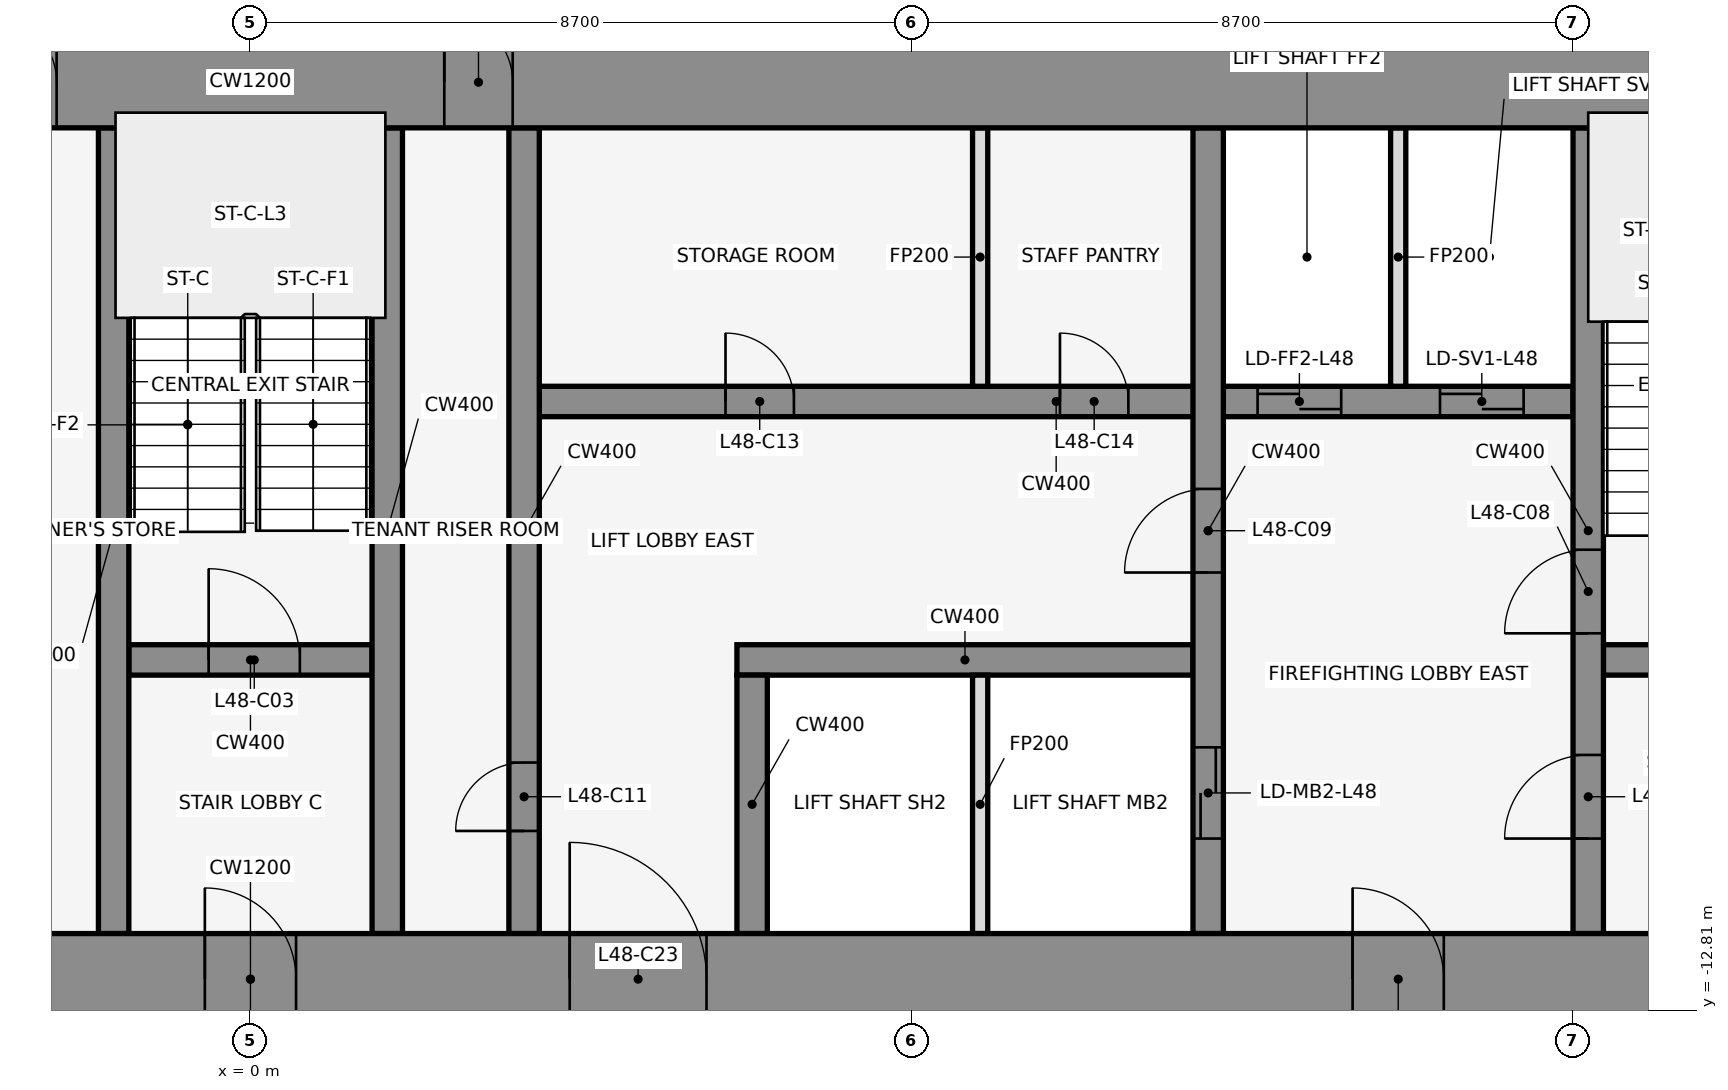
"""IFC4 building model, lengths in metres.
Left out: names, types, materials, properties, quantities, classifications, styles, units other than length and angle.
Written with IfcOpenShell. Run it as: python <this file> out.ifc"""

import sys

from ifc_helpers import new_model, si_unit, direction, frame, frame_2d, origin, place, context, subcontext, project, spatial, rectangle, extrude, element, fill, save


model = new_model("IFC4")
c1 = context("Model", 3, precision=1e-05, world=origin(), true_north=direction((0.0, 1.0)))
c2 = subcontext(c1, "Body", "Model", "MODEL_VIEW")
j1 = project(units=[si_unit("LENGTHUNIT", "METRE"), si_unit("PLANEANGLEUNIT", "RADIAN")], contexts=[c1])
p1 = place(None, origin())
s1 = spatial("IfcSite", under=j1, at=p1, CompositionType="ELEMENT")
p2 = place(p1, origin())
s2 = spatial("IfcBuilding", under=s1, at=p2, CompositionType="ELEMENT")
p3 = place(p2, frame((0.0, 0.0, 215.5)))
s3 = spatial("IfcBuildingStorey", under=s2, at=p3, CompositionType="ELEMENT", Elevation=215.5)
for number, where, z_axis, x_axis in (
    (1, (16.432, -0.105, 0.0), (0.0, 0.0, 1.0), (-0.84, 0.543, 0.0)),
    (2, (1.901, 1.08, 0.0), (0.0, 0.0, 1.0), (-0.84, -0.543, 0.0)),
    (3, (-0.068, -0.105, 0.0), (0.0, 0.0, 1.0), (-0.84, 0.543, 0.0)),
):
    element("IfcWall", number, at=place(p3, frame(where, z_axis=z_axis, x_axis=x_axis)), inside=s3, PredefinedType="STANDARD", context=c2, shape_type="SweptSolid", body=[
        extrude(rectangle(XDim=2.183, YDim=0.25, at=frame_2d((1.091, 0.0))), origin(), (0.0, 0.0, 1.0), 3.95),
    ])
p4 = place(p3, frame((-1.6, -8.2, 0.0), z_axis=(0.0, 0.0, 1.0), x_axis=(1.0, 0.0, 0.0)))
e4 = element("IfcWall", 4, at=p4, inside=s3, PredefinedType="SHEAR", context=c2, shape_type="SweptSolid", body=[
    extrude(rectangle(XDim=3.2, YDim=0.4, at=frame_2d((1.6, 0.0))), origin(), (0.0, 0.0, 1.0), 4.1),
])
p5 = place(p4, frame((1.05, 0.0, 0.0)))
e5 = element("IfcOpeningElement", 5, at=p5, cuts=e4, PredefinedType="OPENING", context=c2, shape_type="SweptSolid", body=[
    extrude(rectangle(XDim=1.2, YDim=2.1, at=frame_2d((0.6, 1.05))), frame((0.0, 0.212, 0.0), z_axis=(0.0, -1.0, 0.0), x_axis=(1.0, 0.0, 0.0)), (0.0, 0.0, 1.0), 0.424),
])
p6 = place(p3, frame((6.4, -8.2, 0.0), z_axis=(0.0, 0.0, 1.0), x_axis=(1.0, 0.0, 0.0)))
e6 = element("IfcWall", 6, at=p6, inside=s3, PredefinedType="SHEAR", context=c2, shape_type="SweptSolid", body=[
    extrude(rectangle(XDim=6.0, YDim=0.4, at=frame_2d((3.0, 0.0))), origin(), (0.0, 0.0, 1.0), 4.1),
])
p7 = place(p3, frame((17.8, -8.2, 0.0), z_axis=(0.0, 0.0, 1.0), x_axis=(1.0, 0.0, 0.0)))
e7 = element("IfcWall", 7, at=p7, inside=s3, PredefinedType="SHEAR", context=c2, shape_type="SweptSolid", body=[
    extrude(rectangle(XDim=3.0, YDim=0.4, at=frame_2d((1.5, 0.0))), origin(), (0.0, 0.0, 1.0), 4.1),
])
p8 = place(p7, frame((0.85, 0.0, 0.0)))
e8 = element("IfcOpeningElement", 8, at=p8, cuts=e7, PredefinedType="OPENING", context=c2, shape_type="SweptSolid", body=[
    extrude(rectangle(XDim=1.2, YDim=2.1, at=frame_2d((0.6, 1.05))), frame((0.0, 0.212, 0.0), z_axis=(0.0, -1.0, 0.0), x_axis=(1.0, 0.0, 0.0)), (0.0, 0.0, 1.0), 0.424),
])
p9 = place(p3, frame((3.8, -4.8, 0.0), z_axis=(0.0, 0.0, 1.0), x_axis=(1.0, 0.0, 0.0)))
e9 = element("IfcWall", 9, at=p9, inside=s3, PredefinedType="SHEAR", context=c2, shape_type="SweptSolid", body=[
    extrude(rectangle(XDim=13.6, YDim=0.4, at=frame_2d((6.8, 0.0))), origin(), (0.0, 0.0, 1.0), 4.1),
])
p10 = place(p9, frame((9.45, 0.0, 0.0)))
e10 = element("IfcOpeningElement", 10, at=p10, cuts=e9, PredefinedType="OPENING", context=c2, shape_type="SweptSolid", body=[
    extrude(rectangle(XDim=1.1, YDim=2.1, at=frame_2d((0.55, 1.05))), frame((0.0, 0.212, 0.0), z_axis=(0.0, -1.0, 0.0), x_axis=(1.0, 0.0, 0.0)), (0.0, 0.0, 1.0), 0.424),
])
p11 = place(p9, frame((11.85, 0.0, 0.0)))
e11 = element("IfcOpeningElement", 11, at=p11, cuts=e9, PredefinedType="OPENING", context=c2, shape_type="SweptSolid", body=[
    extrude(rectangle(XDim=1.1, YDim=2.1, at=frame_2d((0.55, 1.05))), frame((0.0, 0.212, 0.0), z_axis=(0.0, -1.0, 0.0), x_axis=(1.0, 0.0, 0.0)), (0.0, 0.0, 1.0), 0.424),
])
p12 = place(p9, frame((2.45, 0.0, 0.0)))
e12 = element("IfcOpeningElement", 12, at=p12, cuts=e9, PredefinedType="OPENING", context=c2, shape_type="SweptSolid", body=[
    extrude(rectangle(XDim=0.9, YDim=2.1, at=frame_2d((0.45, 1.05))), frame((0.0, 0.212, 0.0), z_axis=(0.0, -1.0, 0.0), x_axis=(1.0, 0.0, 0.0)), (0.0, 0.0, 1.0), 0.424),
])
p13 = place(p9, frame((6.85, 0.0, 0.0)))
e13 = element("IfcOpeningElement", 13, at=p13, cuts=e9, PredefinedType="OPENING", context=c2, shape_type="SweptSolid", body=[
    extrude(rectangle(XDim=0.9, YDim=2.1, at=frame_2d((0.45, 1.05))), frame((0.0, 0.212, 0.0), z_axis=(0.0, -1.0, 0.0), x_axis=(1.0, 0.0, 0.0)), (0.0, 0.0, 1.0), 0.424),
])
for number, where, z_axis, x_axis in (
    (14, (-1.8, -11.8, 0.0), (0.0, 0.0, 1.0), (0.0, 1.0, 0.0)),
    (15, (1.8, -11.8, 0.0), (0.0, 0.0, 1.0), (0.0, 1.0, 0.0)),
):
    element("IfcWall", number, at=place(p3, frame(where, z_axis=z_axis, x_axis=x_axis)), inside=s3, PredefinedType="SHEAR", context=c2, shape_type="SweptSolid", body=[
        extrude(rectangle(XDim=10.6, YDim=0.4, at=frame_2d((5.3, 0.0))), origin(), (0.0, 0.0, 1.0), 4.1),
    ])
p14 = place(p3, frame((3.6, -11.8, 0.0), z_axis=(0.0, 0.0, 1.0), x_axis=(0.0, 1.0, 0.0)))
e16 = element("IfcWall", 16, at=p14, inside=s3, PredefinedType="SHEAR", context=c2, shape_type="SweptSolid", body=[
    extrude(rectangle(XDim=10.6, YDim=0.4, at=frame_2d((5.3, 0.0))), origin(), (0.0, 0.0, 1.0), 4.1),
])
p15 = place(p14, frame((1.35, 0.0, 0.0)))
e17 = element("IfcOpeningElement", 17, at=p15, cuts=e16, PredefinedType="OPENING", context=c2, shape_type="SweptSolid", body=[
    extrude(rectangle(XDim=0.9, YDim=2.1, at=frame_2d((0.45, 1.05))), frame((0.0, 0.212, 0.0), z_axis=(0.0, -1.0, 0.0), x_axis=(1.0, 0.0, 0.0)), (0.0, 0.0, 1.0), 0.424),
])
p16 = place(p3, frame((6.6, -11.8, 0.0), z_axis=(0.0, 0.0, 1.0), x_axis=(0.0, 1.0, 0.0)))
e18 = element("IfcWall", 18, at=p16, inside=s3, PredefinedType="SHEAR", context=c2, shape_type="SweptSolid", body=[
    extrude(rectangle(XDim=3.4, YDim=0.4, at=frame_2d((1.7, 0.0))), origin(), (0.0, 0.0, 1.0), 4.1),
])
for number, where, z_axis, x_axis in (
    (19, (9.6, -11.8, 0.0), (0.0, 0.0, 1.0), (0.0, 1.0, 0.0)),
    (20, (9.6, -4.6, 0.0), (0.0, 0.0, 1.0), (0.0, 1.0, 0.0)),
):
    element("IfcWall", number, at=place(p3, frame(where, z_axis=z_axis, x_axis=x_axis)), inside=s3, PredefinedType="PARTITIONING", context=c2, shape_type="SweptSolid", body=[
        extrude(rectangle(XDim=3.4, YDim=0.2, at=frame_2d((1.7, 0.0))), origin(), (0.0, 0.0, 1.0), 2.84),
    ])
p17 = place(p3, frame((12.6, -11.8, 0.0), z_axis=(0.0, 0.0, 1.0), x_axis=(0.0, 1.0, 0.0)))
e21 = element("IfcWall", 21, at=p17, inside=s3, PredefinedType="SHEAR", context=c2, shape_type="SweptSolid", body=[
    extrude(rectangle(XDim=10.6, YDim=0.4, at=frame_2d((5.3, 0.0))), origin(), (0.0, 0.0, 1.0), 4.1),
])
p18 = place(p17, frame((1.25, 0.0, 0.0)))
e22 = element("IfcOpeningElement", 22, at=p18, cuts=e21, PredefinedType="OPENING", context=c2, shape_type="SweptSolid", body=[
    extrude(rectangle(XDim=1.2, YDim=2.1, at=frame_2d((0.6, 1.05))), frame((0.0, 0.212, 0.0), z_axis=(0.0, -1.0, 0.0), x_axis=(1.0, 0.0, 0.0)), (0.0, 0.0, 1.0), 0.424),
])
p19 = place(p17, frame((4.75, 0.0, 0.0)))
e23 = element("IfcOpeningElement", 23, at=p19, cuts=e21, PredefinedType="OPENING", context=c2, shape_type="SweptSolid", body=[
    extrude(rectangle(XDim=1.1, YDim=2.1, at=frame_2d((0.55, 1.05))), frame((0.0, 0.212, 0.0), z_axis=(0.0, -1.0, 0.0), x_axis=(1.0, 0.0, 0.0)), (0.0, 0.0, 1.0), 0.424),
])
p20 = place(p3, frame((15.1, -4.6, 0.0), z_axis=(0.0, 0.0, 1.0), x_axis=(0.0, 1.0, 0.0)))
e24 = element("IfcWall", 24, at=p20, inside=s3, PredefinedType="PARTITIONING", context=c2, shape_type="SweptSolid", body=[
    extrude(rectangle(XDim=3.4, YDim=0.2, at=frame_2d((1.7, 0.0))), origin(), (0.0, 0.0, 1.0), 2.84),
])
p21 = place(p3, frame((17.6, -11.8, 0.0), z_axis=(0.0, 0.0, 1.0), x_axis=(0.0, 1.0, 0.0)))
e25 = element("IfcWall", 25, at=p21, inside=s3, PredefinedType="SHEAR", context=c2, shape_type="SweptSolid", body=[
    extrude(rectangle(XDim=10.6, YDim=0.4, at=frame_2d((5.3, 0.0))), origin(), (0.0, 0.0, 1.0), 4.1),
])
p22 = place(p21, frame((1.25, 0.0, 0.0)))
e26 = element("IfcOpeningElement", 26, at=p22, cuts=e25, PredefinedType="OPENING", context=c2, shape_type="SweptSolid", body=[
    extrude(rectangle(XDim=1.1, YDim=2.1, at=frame_2d((0.55, 1.05))), frame((0.0, 0.212, 0.0), z_axis=(0.0, -1.0, 0.0), x_axis=(1.0, 0.0, 0.0)), (0.0, 0.0, 1.0), 0.424),
])
p23 = place(p21, frame((3.95, 0.0, 0.0)))
e27 = element("IfcOpeningElement", 27, at=p23, cuts=e25, PredefinedType="OPENING", context=c2, shape_type="SweptSolid", body=[
    extrude(rectangle(XDim=1.1, YDim=2.1, at=frame_2d((0.55, 1.05))), frame((0.0, 0.212, 0.0), z_axis=(0.0, -1.0, 0.0), x_axis=(1.0, 0.0, 0.0)), (0.0, 0.0, 1.0), 0.424),
])
p24 = place(p3, frame((-22.0, -0.6, 0.0), z_axis=(0.0, 0.0, 1.0), x_axis=(1.0, 0.0, 0.0)))
e28 = element("IfcWall", 28, at=p24, inside=s3, PredefinedType="SHEAR", context=c2, shape_type="SweptSolid", body=[
    extrude(rectangle(XDim=44.0, YDim=1.2, at=frame_2d((22.0, 0.0))), origin(), (0.0, 0.0, 1.0), 4.1),
])
p25 = place(p24, frame((18.55, 0.0, 0.0)))
e29 = element("IfcOpeningElement", 29, at=p25, cuts=e28, PredefinedType="OPENING", context=c2, shape_type="SweptSolid", body=[
    extrude(rectangle(XDim=0.9, YDim=2.1, at=frame_2d((0.45, 1.05))), frame((0.0, 0.612, 0.0), z_axis=(0.0, -1.0, 0.0), x_axis=(1.0, 0.0, 0.0)), (0.0, 0.0, 1.0), 1.224),
])
p26 = place(p24, frame((24.55, 0.0, 0.0)))
e30 = element("IfcOpeningElement", 30, at=p26, cuts=e28, PredefinedType="OPENING", context=c2, shape_type="SweptSolid", body=[
    extrude(rectangle(XDim=0.9, YDim=2.1, at=frame_2d((0.45, 1.05))), frame((0.0, 0.612, 0.0), z_axis=(0.0, -1.0, 0.0), x_axis=(1.0, 0.0, 0.0)), (0.0, 0.0, 1.0), 1.224),
])
p27 = place(p3, frame((-22.0, -12.4, 0.0), z_axis=(0.0, 0.0, 1.0), x_axis=(1.0, 0.0, 0.0)))
e31 = element("IfcWall", 31, at=p27, inside=s3, PredefinedType="SHEAR", context=c2, shape_type="SweptSolid", body=[
    extrude(rectangle(XDim=44.0, YDim=1.2, at=frame_2d((22.0, 0.0))), origin(), (0.0, 0.0, 1.0), 4.1),
])
p28 = place(p27, frame((2.2, 0.0, 0.0)))
e32 = element("IfcOpeningElement", 32, at=p28, cuts=e31, PredefinedType="OPENING", context=c2, shape_type="SweptSolid", body=[
    extrude(rectangle(XDim=1.2, YDim=2.1, at=frame_2d((0.6, 1.05))), frame((0.0, 0.612, 0.0), z_axis=(0.0, -1.0, 0.0), x_axis=(1.0, 0.0, 0.0)), (0.0, 0.0, 1.0), 1.224),
])
p29 = place(p27, frame((21.4, 0.0, 0.0)))
e33 = element("IfcOpeningElement", 33, at=p29, cuts=e31, PredefinedType="OPENING", context=c2, shape_type="SweptSolid", body=[
    extrude(rectangle(XDim=1.2, YDim=2.1, at=frame_2d((0.6, 1.05))), frame((0.0, 0.612, 0.0), z_axis=(0.0, -1.0, 0.0), x_axis=(1.0, 0.0, 0.0)), (0.0, 0.0, 1.0), 1.224),
])
p30 = place(p27, frame((40.6, 0.0, 0.0)))
e34 = element("IfcOpeningElement", 34, at=p30, cuts=e31, PredefinedType="OPENING", context=c2, shape_type="SweptSolid", body=[
    extrude(rectangle(XDim=1.2, YDim=2.1, at=frame_2d((0.6, 1.05))), frame((0.0, 0.612, 0.0), z_axis=(0.0, -1.0, 0.0), x_axis=(1.0, 0.0, 0.0)), (0.0, 0.0, 1.0), 1.224),
])
p31 = place(p27, frame((16.0, 0.0, 0.0)))
e35 = element("IfcOpeningElement", 35, at=p31, cuts=e31, PredefinedType="OPENING", context=c2, shape_type="SweptSolid", body=[
    extrude(rectangle(XDim=1.8, YDim=2.1, at=frame_2d((0.9, 1.05))), frame((0.0, 0.612, 0.0), z_axis=(0.0, -1.0, 0.0), x_axis=(1.0, 0.0, 0.0)), (0.0, 0.0, 1.0), 1.224),
])
p32 = place(p27, frame((6.3, 0.0, 0.0)))
e36 = element("IfcOpeningElement", 36, at=p32, cuts=e31, PredefinedType="OPENING", context=c2, shape_type="SweptSolid", body=[
    extrude(rectangle(XDim=1.2, YDim=2.1, at=frame_2d((0.6, 1.05))), frame((0.0, 0.612, 0.0), z_axis=(0.0, -1.0, 0.0), x_axis=(1.0, 0.0, 0.0)), (0.0, 0.0, 1.0), 1.224),
])
p33 = place(p27, frame((26.2, 0.0, 0.0)))
e37 = element("IfcOpeningElement", 37, at=p33, cuts=e31, PredefinedType="OPENING", context=c2, shape_type="SweptSolid", body=[
    extrude(rectangle(XDim=1.8, YDim=2.1, at=frame_2d((0.9, 1.05))), frame((0.0, 0.612, 0.0), z_axis=(0.0, -1.0, 0.0), x_axis=(1.0, 0.0, 0.0)), (0.0, 0.0, 1.0), 1.224),
])
p34 = place(p27, frame((36.5, 0.0, 0.0)))
e38 = element("IfcOpeningElement", 38, at=p34, cuts=e31, PredefinedType="OPENING", context=c2, shape_type="SweptSolid", body=[
    extrude(rectangle(XDim=1.2, YDim=2.1, at=frame_2d((0.6, 1.05))), frame((0.0, 0.612, 0.0), z_axis=(0.0, -1.0, 0.0), x_axis=(1.0, 0.0, 0.0)), (0.0, 0.0, 1.0), 1.224),
])
p35 = place(p5, origin())
e39 = element("IfcDoor", 39, at=p35, inside=s3, OperationType="SINGLE_SWING_LEFT", PredefinedType="DOOR", context=c2, shape_type="SweptSolid", body=[
    extrude(rectangle(XDim=1.2, YDim=2.1, at=frame_2d((0.6, 1.05))), frame((0.0, 0.025, 0.0), z_axis=(0.0, -1.0, 0.0), x_axis=(1.0, 0.0, 0.0)), (0.0, 0.0, 1.0), 0.05),
])
fill(e5, e39)
p36 = place(p22, origin())
e40 = element("IfcDoor", 40, at=p36, inside=s3, OperationType="SINGLE_SWING_LEFT", PredefinedType="DOOR", context=c2, shape_type="SweptSolid", body=[
    extrude(rectangle(XDim=1.1, YDim=2.1, at=frame_2d((0.55, 1.05))), frame((0.0, 0.025, 0.0), z_axis=(0.0, -1.0, 0.0), x_axis=(1.0, 0.0, 0.0)), (0.0, 0.0, 1.0), 0.05),
])
fill(e26, e40)
p37 = place(p18, origin())
e41 = element("IfcDoor", 41, at=p37, inside=s3, OperationType="DOUBLE_DOOR_SLIDING", PredefinedType="DOOR", context=c2, shape_type="SweptSolid", body=[
    extrude(rectangle(XDim=1.2, YDim=2.1, at=frame_2d((0.6, 1.05))), frame((0.0, 0.025, 0.0), z_axis=(0.0, -1.0, 0.0), x_axis=(1.0, 0.0, 0.0)), (0.0, 0.0, 1.0), 0.05),
])
fill(e22, e41)
p38 = place(p10, origin())
e42 = element("IfcDoor", 42, at=p38, inside=s3, OperationType="DOUBLE_DOOR_SLIDING", PredefinedType="DOOR", context=c2, shape_type="SweptSolid", body=[
    extrude(rectangle(XDim=1.1, YDim=2.1, at=frame_2d((0.55, 1.05))), frame((0.0, 0.025, 0.0), z_axis=(0.0, -1.0, 0.0), x_axis=(1.0, 0.0, 0.0)), (0.0, 0.0, 1.0), 0.05),
])
fill(e10, e42)
p39 = place(p11, origin())
e43 = element("IfcDoor", 43, at=p39, inside=s3, OperationType="DOUBLE_DOOR_SLIDING", PredefinedType="DOOR", context=c2, shape_type="SweptSolid", body=[
    extrude(rectangle(XDim=1.1, YDim=2.1, at=frame_2d((0.55, 1.05))), frame((0.0, 0.025, 0.0), z_axis=(0.0, -1.0, 0.0), x_axis=(1.0, 0.0, 0.0)), (0.0, 0.0, 1.0), 0.05),
])
fill(e11, e43)
p40 = place(p23, origin())
e44 = element("IfcDoor", 44, at=p40, inside=s3, OperationType="SINGLE_SWING_RIGHT", PredefinedType="DOOR", context=c2, shape_type="SweptSolid", body=[
    extrude(rectangle(XDim=1.1, YDim=2.1, at=frame_2d((0.55, 1.05))), frame((0.0, 0.025, 0.0), z_axis=(0.0, -1.0, 0.0), x_axis=(1.0, 0.0, 0.0)), (0.0, 0.0, 1.0), 0.05),
])
fill(e27, e44)
p41 = place(p19, frame((1.1, 0.0, 0.0), z_axis=(0.0, 0.0, 1.0), x_axis=(-1.0, 0.0, 0.0)))
e45 = element("IfcDoor", 45, at=p41, inside=s3, OperationType="SINGLE_SWING_RIGHT", PredefinedType="DOOR", context=c2, shape_type="SweptSolid", body=[
    extrude(rectangle(XDim=1.1, YDim=2.1, at=frame_2d((0.55, 1.05))), frame((0.0, 0.025, 0.0), z_axis=(0.0, -1.0, 0.0), x_axis=(1.0, 0.0, 0.0)), (0.0, 0.0, 1.0), 0.05),
])
fill(e23, e45)
p42 = place(p15, origin())
e46 = element("IfcDoor", 46, at=p42, inside=s3, OperationType="SINGLE_SWING_LEFT", PredefinedType="DOOR", context=c2, shape_type="SweptSolid", body=[
    extrude(rectangle(XDim=0.9, YDim=2.1, at=frame_2d((0.45, 1.05))), frame((0.0, 0.025, 0.0), z_axis=(0.0, -1.0, 0.0), x_axis=(1.0, 0.0, 0.0)), (0.0, 0.0, 1.0), 0.05),
])
fill(e17, e46)
p43 = place(p12, origin())
e47 = element("IfcDoor", 47, at=p43, inside=s3, OperationType="SINGLE_SWING_LEFT", PredefinedType="DOOR", context=c2, shape_type="SweptSolid", body=[
    extrude(rectangle(XDim=0.9, YDim=2.1, at=frame_2d((0.45, 1.05))), frame((0.0, 0.025, 0.0), z_axis=(0.0, -1.0, 0.0), x_axis=(1.0, 0.0, 0.0)), (0.0, 0.0, 1.0), 0.05),
])
fill(e12, e47)
p44 = place(p13, origin())
e48 = element("IfcDoor", 48, at=p44, inside=s3, OperationType="SINGLE_SWING_RIGHT", PredefinedType="DOOR", context=c2, shape_type="SweptSolid", body=[
    extrude(rectangle(XDim=0.9, YDim=2.1, at=frame_2d((0.45, 1.05))), frame((0.0, 0.025, 0.0), z_axis=(0.0, -1.0, 0.0), x_axis=(1.0, 0.0, 0.0)), (0.0, 0.0, 1.0), 0.05),
])
fill(e13, e48)
p45 = place(p25, origin())
e49 = element("IfcDoor", 49, at=p45, inside=s3, OperationType="SINGLE_SWING_LEFT", PredefinedType="DOOR", context=c2, shape_type="SweptSolid", body=[
    extrude(rectangle(XDim=0.9, YDim=2.1, at=frame_2d((0.45, 1.05))), frame((0.0, 0.025, 0.0), z_axis=(0.0, -1.0, 0.0), x_axis=(1.0, 0.0, 0.0)), (0.0, 0.0, 1.0), 0.05),
])
fill(e29, e49)
p46 = place(p26, origin())
e50 = element("IfcDoor", 50, at=p46, inside=s3, OperationType="SINGLE_SWING_LEFT", PredefinedType="DOOR", context=c2, shape_type="SweptSolid", body=[
    extrude(rectangle(XDim=0.9, YDim=2.1, at=frame_2d((0.45, 1.05))), frame((0.0, 0.025, 0.0), z_axis=(0.0, -1.0, 0.0), x_axis=(1.0, 0.0, 0.0)), (0.0, 0.0, 1.0), 0.05),
])
fill(e30, e50)
p47 = place(p29, frame((1.2, 0.0, 0.0), z_axis=(0.0, 0.0, 1.0), x_axis=(-1.0, 0.0, 0.0)))
e51 = element("IfcDoor", 51, at=p47, inside=s3, OperationType="SINGLE_SWING_RIGHT", PredefinedType="DOOR", context=c2, shape_type="SweptSolid", body=[
    extrude(rectangle(XDim=1.2, YDim=2.1, at=frame_2d((0.6, 1.05))), frame((0.0, 0.025, 0.0), z_axis=(0.0, -1.0, 0.0), x_axis=(1.0, 0.0, 0.0)), (0.0, 0.0, 1.0), 0.05),
])
fill(e33, e51)
p48 = place(p33, origin())
e52 = element("IfcDoor", 52, at=p48, inside=s3, OperationType="SINGLE_SWING_LEFT", PredefinedType="DOOR", context=c2, shape_type="SweptSolid", body=[
    extrude(rectangle(XDim=1.8, YDim=2.1, at=frame_2d((0.9, 1.05))), frame((0.0, 0.025, 0.0), z_axis=(0.0, -1.0, 0.0), x_axis=(1.0, 0.0, 0.0)), (0.0, 0.0, 1.0), 0.05),
])
fill(e37, e52)
p49 = place(p34, frame((1.2, 0.0, 0.0), z_axis=(0.0, 0.0, 1.0), x_axis=(-1.0, 0.0, 0.0)))
e53 = element("IfcDoor", 53, at=p49, inside=s3, OperationType="SINGLE_SWING_RIGHT", PredefinedType="DOOR", context=c2, shape_type="SweptSolid", body=[
    extrude(rectangle(XDim=1.2, YDim=2.1, at=frame_2d((0.6, 1.05))), frame((0.0, 0.025, 0.0), z_axis=(0.0, -1.0, 0.0), x_axis=(1.0, 0.0, 0.0)), (0.0, 0.0, 1.0), 0.05),
])
fill(e38, e53)
save(model, sys.argv[1])
